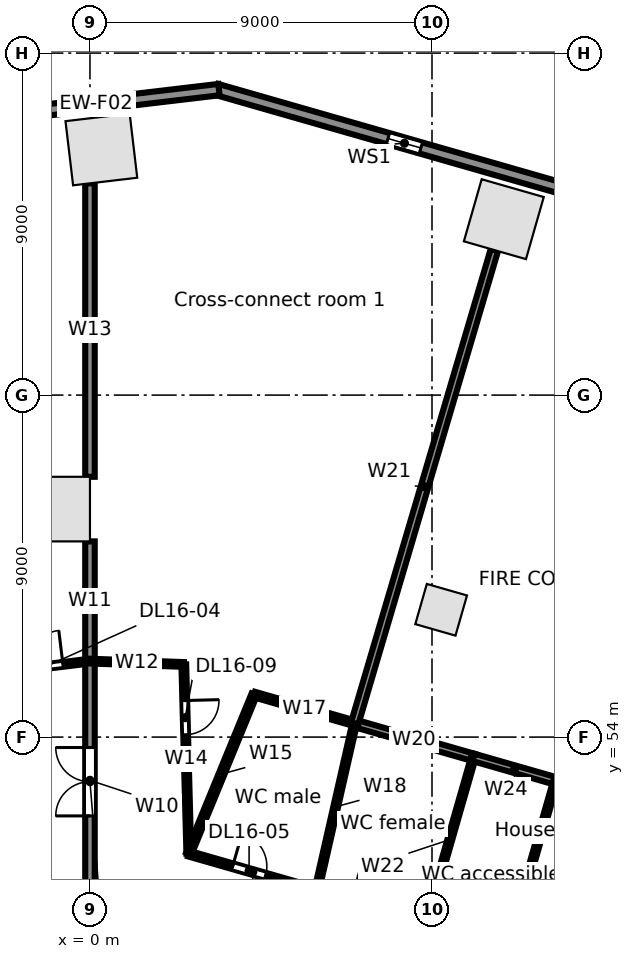
"""IFC4 building model, lengths in metres.
Left out: names, types, materials, properties, quantities, classifications, styles, units other than length and angle.
Written with IfcOpenShell. Run it as: python <this file> out.ifc"""

import sys

from ifc_helpers import new_model, si_unit, direction, frame, frame_2d, origin, origin_2d, place, context, subcontext, project, spatial, rectangle, extrude, element, fill, save


model = new_model("IFC4")
c1 = context("Model", 3, precision=1e-05, world=origin(), true_north=direction((0.0, 1.0)))
c2 = subcontext(c1, "Body", "Model", "MODEL_VIEW")
j1 = project(units=[si_unit("LENGTHUNIT", "METRE"), si_unit("PLANEANGLEUNIT", "RADIAN")], contexts=[c1])
p1 = place(None, origin())
s1 = spatial("IfcSite", under=j1, at=p1, CompositionType="ELEMENT")
p2 = place(p1, origin())
s2 = spatial("IfcBuilding", under=s1, at=p2, CompositionType="ELEMENT")
p3 = place(p2, frame((0.0, 0.0, 81.5)))
s3 = spatial("IfcBuildingStorey", under=s2, at=p3, CompositionType="ELEMENT", Elevation=81.5)
for number, where, z_axis, x_axis in (
    (1, (10.89, 67.629, 0.0), (0.0, 0.0, 1.0), (-0.961, 0.276, 0.0)),
    (2, (0.3, 69.464, 0.0), (0.0, 0.0, 1.0), (-0.993, -0.118, 0.0)),
    (3, (-0.85, 60.0, 0.0), (0.0, 0.0, 1.0), (0.0, 1.0, 0.0)),
):
    element("IfcColumn", number, at=place(p3, frame(where, z_axis=z_axis, x_axis=x_axis)), inside=s3, PredefinedType="COLUMN", context=c2, shape_type="SweptSolid", body=[
        extrude(rectangle(XDim=1.7, YDim=1.7, at=origin_2d()), origin(), (0.0, 0.0, 1.0), 5.0),
    ])
p4 = place(p3, frame((9.241, 57.35, 0.0), z_axis=(0.0, 0.0, 1.0), x_axis=(0.961261695938, -0.275637355817, 0.0)))
e4 = element("IfcColumn", 4, at=p4, inside=s3, PredefinedType="COLUMN", context=c2, shape_type="SweptSolid", body=[
    extrude(rectangle(XDim=1.1, YDim=1.1, at=origin_2d()), origin(), (0.0, 0.0, 1.0), 5.0),
])
p5 = place(p3, frame((3.335, 71.044, 0.0), z_axis=(0.0, 0.0, 1.0), x_axis=(0.961260130989, -0.275642813387, 0.0)))
e5 = element("IfcWall", 5, at=p5, inside=s3, PredefinedType="STANDARD", context=c2, shape_type="SweptSolid", body=[
    extrude(rectangle(XDim=32.741, YDim=0.3, at=frame_2d((16.371, 0.0))), origin(), (0.0, 0.0, 1.0), 4.68),
])
p6 = place(p5, frame((29.207, 0.0, 0.6)))
e6 = element("IfcOpeningElement", 6, at=p6, cuts=e5, PredefinedType="OPENING", context=c2, shape_type="SweptSolid", body=[
    extrude(rectangle(XDim=0.9, YDim=3.2, at=frame_2d((0.45, 1.6))), frame((0.0, 0.16, 0.0), z_axis=(0.0, -1.0, 0.0), x_axis=(1.0, 0.0, 0.0)), (0.0, 0.0, 1.0), 0.32),
])
p7 = place(p5, frame((21.034, 0.0, 0.6)))
e7 = element("IfcOpeningElement", 7, at=p7, cuts=e5, PredefinedType="OPENING", context=c2, shape_type="SweptSolid", body=[
    extrude(rectangle(XDim=0.9, YDim=3.2, at=frame_2d((0.45, 1.6))), frame((0.0, 0.16, 0.0), z_axis=(0.0, -1.0, 0.0), x_axis=(1.0, 0.0, 0.0)), (0.0, 0.0, 1.0), 0.32),
])
p8 = place(p5, frame((12.861, 0.0, 0.6)))
e8 = element("IfcOpeningElement", 8, at=p8, cuts=e5, PredefinedType="OPENING", context=c2, shape_type="SweptSolid", body=[
    extrude(rectangle(XDim=0.9, YDim=3.2, at=frame_2d((0.45, 1.6))), frame((0.0, 0.16, 0.0), z_axis=(0.0, -1.0, 0.0), x_axis=(1.0, 0.0, 0.0)), (0.0, 0.0, 1.0), 0.32),
])
p9 = place(p5, frame((4.688, 0.0, 0.6)))
e9 = element("IfcOpeningElement", 9, at=p9, cuts=e5, PredefinedType="OPENING", context=c2, shape_type="SweptSolid", body=[
    extrude(rectangle(XDim=0.9, YDim=3.2, at=frame_2d((0.45, 1.6))), frame((0.0, 0.16, 0.0), z_axis=(0.0, -1.0, 0.0), x_axis=(1.0, 0.0, 0.0)), (0.0, 0.0, 1.0), 0.32),
])
p10 = place(p3, frame((-3.076, 70.273, 0.0), z_axis=(0.0, 0.0, 1.0), x_axis=(0.993067743007, 0.117543429416, 0.0)))
e10 = element("IfcWall", 10, at=p10, inside=s3, PredefinedType="STANDARD", context=c2, shape_type="SweptSolid", body=[
    extrude(rectangle(XDim=6.516, YDim=0.3, at=frame_2d((3.258, 0.0))), origin(), (0.0, 0.0, 1.0), 4.68),
])
p11 = place(p3, frame((-2.547, 55.687, 0.0), z_axis=(0.0, 0.0, 1.0), x_axis=(0.992534770107, 0.121962002806, 0.0)))
e11 = element("IfcWall", 11, at=p11, inside=s3, PredefinedType="PARTITIONING", context=c2, shape_type="SweptSolid", body=[
    extrude(rectangle(XDim=2.566, YDim=0.125, at=frame_2d((1.283, 0.0))), origin(), (0.0, 0.0, 1.0), 3.742),
])
p12 = place(p11, frame((0.95, 0.0, 0.0)))
e12 = element("IfcOpeningElement", 12, at=p12, cuts=e11, PredefinedType="OPENING", context=c2, shape_type="SweptSolid", body=[
    extrude(rectangle(XDim=0.9, YDim=2.1, at=frame_2d((0.45, 1.05))), frame((0.0, 0.073, 0.0), z_axis=(0.0, -1.0, 0.0), x_axis=(1.0, 0.0, 0.0)), (0.0, 0.0, 1.0), 0.145),
])
p13 = place(p3, frame((0.0, 49.726, 0.0), z_axis=(0.0, 0.0, 1.0), x_axis=(0.0, 1.0, 0.0)))
e13 = element("IfcWall", 13, at=p13, inside=s3, PredefinedType="PARTITIONING", context=c2, shape_type="SweptSolid", body=[
    extrude(rectangle(XDim=6.274, YDim=0.25, at=frame_2d((3.137, 0.0))), origin(), (0.0, 0.0, 1.0), 4.68),
])
p14 = place(p13, frame((2.2, 0.0, 0.0)))
e14 = element("IfcOpeningElement", 14, at=p14, cuts=e13, PredefinedType="OPENING", context=c2, shape_type="SweptSolid", body=[
    extrude(rectangle(XDim=1.8, YDim=2.1, at=frame_2d((0.9, 1.05))), frame((0.0, 0.135, 0.0), z_axis=(0.0, -1.0, 0.0), x_axis=(1.0, 0.0, 0.0)), (0.0, 0.0, 1.0), 0.27),
])
p15 = place(p3, frame((0.0, 56.0, 0.0), z_axis=(0.0, 0.0, 1.0), x_axis=(0.0, 1.0, 0.0)))
e15 = element("IfcWall", 15, at=p15, inside=s3, PredefinedType="PARTITIONING", context=c2, shape_type="SweptSolid", body=[
    extrude(rectangle(XDim=3.15, YDim=0.25, at=frame_2d((1.575, 0.0))), origin(), (0.0, 0.0, 1.0), 4.68),
])
p16 = place(p3, frame((0.0, 56.0, 0.0), z_axis=(0.0, 0.0, 1.0), x_axis=(0.999349313684, -0.036068673934, 0.0)))
e16 = element("IfcWall", 16, at=p16, inside=s3, PredefinedType="PARTITIONING", context=c2, shape_type="SweptSolid", body=[
    extrude(rectangle(XDim=2.471, YDim=0.125, at=frame_2d((1.235, 0.0))), origin(), (0.0, 0.0, 1.0), 4.68),
])
p17 = place(p3, frame((0.0, 60.85, 0.0), z_axis=(0.0, 0.0, 1.0), x_axis=(0.0, 1.0, 0.0)))
e17 = element("IfcWall", 17, at=p17, inside=s3, PredefinedType="PARTITIONING", context=c2, shape_type="SweptSolid", body=[
    extrude(rectangle(XDim=7.723, YDim=0.25, at=frame_2d((3.861, 0.0))), origin(), (0.0, 0.0, 1.0), 3.952),
])
p18 = place(p3, frame((2.469, 55.911, 0.0), z_axis=(0.0, 0.0, 1.0), x_axis=(0.02651808123, -0.999648333849, 0.0)))
e18 = element("IfcWall", 18, at=p18, inside=s3, PredefinedType="PARTITIONING", context=c2, shape_type="SweptSolid", body=[
    extrude(rectangle(XDim=4.981, YDim=0.125, at=frame_2d((2.49, 0.0))), origin(), (0.0, 0.0, 1.0), 4.68),
])
p19 = place(p18, frame((0.95, 0.0, 0.0)))
e19 = element("IfcOpeningElement", 19, at=p19, cuts=e18, PredefinedType="OPENING", context=c2, shape_type="SweptSolid", body=[
    extrude(rectangle(XDim=0.9, YDim=2.1, at=frame_2d((0.45, 1.05))), frame((0.0, 0.073, 0.0), z_axis=(0.0, -1.0, 0.0), x_axis=(1.0, 0.0, 0.0)), (0.0, 0.0, 1.0), 0.145),
])
p20 = place(p3, frame((2.601, 50.932, 0.0), z_axis=(0.0, 0.0, 1.0), x_axis=(0.380066317543, 0.924959239247, 0.0)))
e20 = element("IfcWall", 20, at=p20, inside=s3, PredefinedType="PARTITIONING", context=c2, shape_type="SweptSolid", body=[
    extrude(rectangle(XDim=4.528, YDim=0.15, at=frame_2d((2.264, 0.0))), origin(), (0.0, 0.0, 1.0), 4.68),
])
p21 = place(p3, frame((2.601, 50.932, 0.0), z_axis=(0.0, 0.0, 1.0), x_axis=(0.961265606965, -0.27562371608, 0.0)))
e21 = element("IfcWall", 21, at=p21, inside=s3, PredefinedType="PARTITIONING", context=c2, shape_type="SweptSolid", body=[
    extrude(rectangle(XDim=3.5, YDim=0.15, at=frame_2d((1.75, 0.0))), origin(), (0.0, 0.0, 1.0), 4.68),
])
p22 = place(p21, frame((1.2, 0.0, 0.0)))
e22 = element("IfcOpeningElement", 22, at=p22, cuts=e21, PredefinedType="OPENING", context=c2, shape_type="SweptSolid", body=[
    extrude(rectangle(XDim=0.9, YDim=2.1, at=frame_2d((0.45, 1.05))), frame((0.0, 0.085, 0.0), z_axis=(0.0, -1.0, 0.0), x_axis=(1.0, 0.0, 0.0)), (0.0, 0.0, 1.0), 0.17),
])
p23 = place(p3, frame((4.322, 55.12, 0.0), z_axis=(0.0, 0.0, 1.0), x_axis=(0.961272337704, -0.275600240865, 0.0)))
e23 = element("IfcWall", 23, at=p23, inside=s3, PredefinedType="PARTITIONING", context=c2, shape_type="SweptSolid", body=[
    extrude(rectangle(XDim=2.75, YDim=0.15, at=frame_2d((1.375, 0.0))), origin(), (0.0, 0.0, 1.0), 4.68),
])
p24 = place(p3, frame((5.966, 49.967, 0.0), z_axis=(0.0, 0.0, 1.0), x_axis=(0.221859891223, 0.975078555126, 0.0)))
e24 = element("IfcWall", 24, at=p24, inside=s3, PredefinedType="PARTITIONING", context=c2, shape_type="SweptSolid", body=[
    extrude(rectangle(XDim=4.507, YDim=0.125, at=frame_2d((2.254, 0.0))), origin(), (0.0, 0.0, 1.0), 4.68),
])
p25 = place(p3, frame((6.966, 54.362, 0.0), z_axis=(0.0, 0.0, 1.0), x_axis=(0.961245650832, -0.275693305607, 0.0)))
e25 = element("IfcWall", 25, at=p25, inside=s3, PredefinedType="PARTITIONING", context=c2, shape_type="SweptSolid", body=[
    extrude(rectangle(XDim=3.25, YDim=0.2, at=frame_2d((1.625, 0.0))), origin(), (0.0, 0.0, 1.0), 3.852),
])
p26 = place(p3, frame((6.966, 54.362, 0.0), z_axis=(0.0, 0.0, 1.0), x_axis=(0.283027392509, 0.959111826165, 0.0)))
e26 = element("IfcWall", 26, at=p26, inside=s3, PredefinedType="PARTITIONING", context=c2, shape_type="SweptSolid", body=[
    extrude(rectangle(XDim=12.985, YDim=0.2, at=frame_2d((6.492, 0.0))), origin(), (0.0, 0.0, 1.0), 3.742),
])
p27 = place(p3, frame((8.849, 49.14, 0.0), z_axis=(0.0, 0.0, 1.0), x_axis=(0.275731175537, 0.961234788612, 0.0)))
e27 = element("IfcWall", 27, at=p27, inside=s3, PredefinedType="PARTITIONING", context=c2, shape_type="SweptSolid", body=[
    extrude(rectangle(XDim=4.501, YDim=0.125, at=frame_2d((2.25, 0.0))), origin(), (0.0, 0.0, 1.0), 3.852),
])
p28 = place(p3, frame((10.09, 53.466, 0.0), z_axis=(0.0, 0.0, 1.0), x_axis=(0.961269670038, -0.275609545309, 0.0)))
e28 = element("IfcWall", 28, at=p28, inside=s3, PredefinedType="PARTITIONING", context=c2, shape_type="SweptSolid", body=[
    extrude(rectangle(XDim=2.25, YDim=0.2, at=frame_2d((1.125, 0.0))), origin(), (0.0, 0.0, 1.0), 3.742),
])
p29 = place(p3, frame((11.012, 48.52, 0.0), z_axis=(0.0, 0.0, 1.0), x_axis=(0.275745553681, 0.96123066411, 0.0)))
e29 = element("IfcWall", 29, at=p29, inside=s3, PredefinedType="PARTITIONING", context=c2, shape_type="SweptSolid", body=[
    extrude(rectangle(XDim=4.5, YDim=0.125, at=frame_2d((2.25, 0.0))), origin(), (0.0, 0.0, 1.0), 4.68),
])
p30 = place(p9, origin())
e30 = element("IfcWindow", 30, at=p30, inside=s3, PartitioningType="SINGLE_PANEL", PredefinedType="WINDOW", context=c2, shape_type="SweptSolid", body=[
    extrude(rectangle(XDim=0.9, YDim=3.2, at=frame_2d((0.45, 1.6))), frame((0.0, 0.03, 0.0), z_axis=(0.0, -1.0, 0.0), x_axis=(1.0, 0.0, 0.0)), (0.0, 0.0, 1.0), 0.06),
])
fill(e9, e30)
p31 = place(p12, origin())
e31 = element("IfcDoor", 31, at=p31, inside=s3, OperationType="SINGLE_SWING_RIGHT", PredefinedType="DOOR", context=c2, shape_type="SweptSolid", body=[
    extrude(rectangle(XDim=0.9, YDim=2.1, at=frame_2d((0.45, 1.05))), frame((0.0, 0.025, 0.0), z_axis=(0.0, -1.0, 0.0), x_axis=(1.0, 0.0, 0.0)), (0.0, 0.0, 1.0), 0.05),
])
fill(e12, e31)
p32 = place(p22, origin())
e32 = element("IfcDoor", 32, at=p32, inside=s3, OperationType="SINGLE_SWING_LEFT", PredefinedType="DOOR", context=c2, shape_type="SweptSolid", body=[
    extrude(rectangle(XDim=0.9, YDim=2.1, at=frame_2d((0.45, 1.05))), frame((0.0, 0.025, 0.0), z_axis=(0.0, -1.0, 0.0), x_axis=(1.0, 0.0, 0.0)), (0.0, 0.0, 1.0), 0.05),
])
fill(e22, e32)
p33 = place(p19, origin())
e33 = element("IfcDoor", 33, at=p33, inside=s3, OperationType="SINGLE_SWING_LEFT", PredefinedType="DOOR", context=c2, shape_type="SweptSolid", body=[
    extrude(rectangle(XDim=0.9, YDim=2.1, at=frame_2d((0.45, 1.05))), frame((0.0, 0.025, 0.0), z_axis=(0.0, -1.0, 0.0), x_axis=(1.0, 0.0, 0.0)), (0.0, 0.0, 1.0), 0.05),
])
fill(e19, e33)
p34 = place(p14, origin())
e34 = element("IfcDoor", 34, at=p34, inside=s3, OperationType="DOUBLE_DOOR_SINGLE_SWING", PredefinedType="DOOR", context=c2, shape_type="SweptSolid", body=[
    extrude(rectangle(XDim=1.8, YDim=2.1, at=frame_2d((0.9, 1.05))), frame((0.0, 0.025, 0.0), z_axis=(0.0, -1.0, 0.0), x_axis=(1.0, 0.0, 0.0)), (0.0, 0.0, 1.0), 0.05),
])
fill(e14, e34)
save(model, sys.argv[1])
